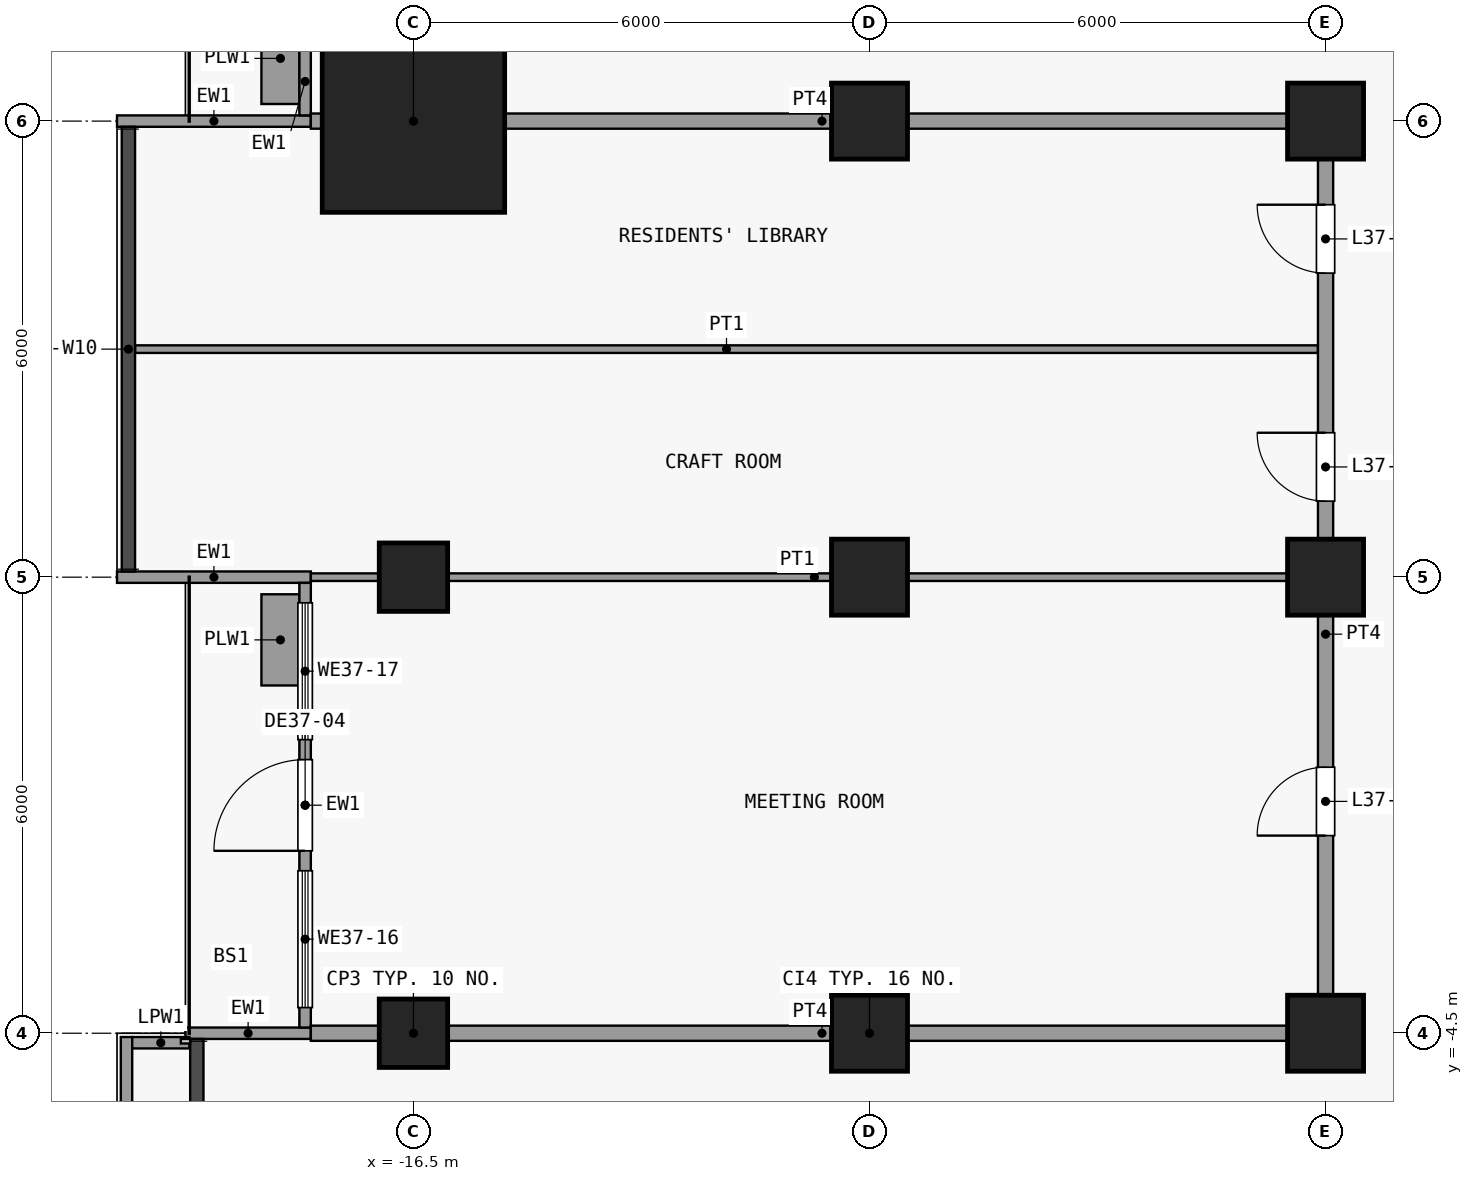
"""IFC4 building model, lengths in metres.
Left out: names, types, materials, properties, quantities, classifications, styles, units other than length and angle.
Written with IfcOpenShell. Run it as: python <this file> out.ifc"""

import sys

from ifc_helpers import new_model, si_unit, direction, frame, frame_2d, origin, origin_2d, place, context, subcontext, project, spatial, rectangle, extrude, element, fill, save


model = new_model("IFC4")
c1 = context("Model", 3, precision=1e-05, world=origin(), true_north=direction((0.0, 1.0)))
c2 = subcontext(c1, "Body", "Model", "MODEL_VIEW")
j1 = project(units=[si_unit("LENGTHUNIT", "METRE"), si_unit("PLANEANGLEUNIT", "RADIAN")], contexts=[c1])
p1 = place(None, origin())
s1 = spatial("IfcSite", under=j1, at=p1, CompositionType="ELEMENT")
p2 = place(p1, origin())
s2 = spatial("IfcBuilding", under=s1, at=p2, CompositionType="ELEMENT")
p3 = place(p2, frame((0.0, 0.0, 152.9)))
s3 = spatial("IfcBuildingStorey", under=s2, at=p3, CompositionType="ELEMENT", Elevation=152.9)
for number, where, z_axis, x_axis in (
    (1, (-16.5, -4.5, 0.0), (0.0, 0.0, 1.0), (1.0, 0.0, 0.0)),
    (2, (-16.5, 1.5, 0.0), (0.0, 0.0, 1.0), (1.0, 0.0, 0.0)),
):
    element("IfcColumn", number, at=place(p3, frame(where, z_axis=z_axis, x_axis=x_axis)), inside=s3, PredefinedType="COLUMN", context=c2, shape_type="SweptSolid", body=[
        extrude(rectangle(XDim=0.9, YDim=0.9, at=origin_2d()), origin(), (0.0, 0.0, 1.0), 3.6),
    ])
p4 = place(p3, frame((-16.5, 7.5, 0.0), z_axis=(0.0, 0.0, 1.0), x_axis=(1.0, 0.0, 0.0)))
e3 = element("IfcColumn", 3, at=p4, inside=s3, PredefinedType="COLUMN", context=c2, shape_type="SweptSolid", body=[
    extrude(rectangle(XDim=2.4, YDim=2.4, at=origin_2d()), origin(), (0.0, 0.0, 1.0), 3.6),
])
for number, where, z_axis, x_axis in (
    (4, (-10.5, -4.5, 0.0), (0.0, 0.0, 1.0), (1.0, 0.0, 0.0)),
    (5, (-10.5, 1.5, 0.0), (0.0, 0.0, 1.0), (1.0, 0.0, 0.0)),
    (6, (-10.5, 7.5, 0.0), (0.0, 0.0, 1.0), (1.0, 0.0, 0.0)),
    (7, (-4.5, -4.5, 0.0), (0.0, 0.0, 1.0), (1.0, 0.0, 0.0)),
    (8, (-4.5, 1.5, 0.0), (0.0, 0.0, 1.0), (1.0, 0.0, 0.0)),
    (9, (-4.5, 7.5, 0.0), (0.0, 0.0, 1.0), (1.0, 0.0, 0.0)),
):
    element("IfcColumn", number, at=place(p3, frame(where, z_axis=z_axis, x_axis=x_axis)), inside=s3, PredefinedType="COLUMN", context=c2, shape_type="SweptSolid", body=[
        extrude(rectangle(XDim=1.0, YDim=1.0, at=origin_2d()), origin(), (0.0, 0.0, 1.0), 3.6),
    ])
p5 = place(p3, frame((-17.85, -4.5, 0.0), z_axis=(0.0, 0.0, 1.0), x_axis=(-1.0, 0.0, 0.0)))
e10 = element("IfcWall", 10, at=p5, inside=s3, PredefinedType="SOLIDWALL", context=c2, shape_type="SweptSolid", body=[
    extrude(rectangle(XDim=1.65, YDim=0.15, at=frame_2d((0.825, 0.0))), origin(), (0.0, 0.0, 1.0), 3.3),
])
p6 = place(p3, frame((-17.85, 1.5, 0.0), z_axis=(0.0, 0.0, 1.0), x_axis=(-1.0, 0.0, 0.0)))
e11 = element("IfcWall", 11, at=p6, inside=s3, PredefinedType="SOLIDWALL", context=c2, shape_type="SweptSolid", body=[
    extrude(rectangle(XDim=2.55, YDim=0.15, at=frame_2d((1.275, 0.0))), origin(), (0.0, 0.0, 1.0), 3.3),
])
p7 = place(p3, frame((-17.925, -4.425, 0.0), z_axis=(0.0, 0.0, 1.0), x_axis=(0.0, 1.0, 0.0)))
e12 = element("IfcWall", 12, at=p7, inside=s3, PredefinedType="SOLIDWALL", context=c2, shape_type="SweptSolid", body=[
    extrude(rectangle(XDim=5.85, YDim=0.15, at=frame_2d((2.925, 0.0))), origin(), (0.0, 0.0, 1.0), 3.3),
])
p8 = place(p7, frame((2.325, 0.0, 0.0)))
e13 = element("IfcOpeningElement", 13, at=p8, cuts=e12, PredefinedType="OPENING", context=c2, shape_type="SweptSolid", body=[
    extrude(rectangle(XDim=1.2, YDim=2.4, at=frame_2d((0.6, 1.2))), frame((0.0, 0.085, 0.0), z_axis=(0.0, -1.0, 0.0), x_axis=(1.0, 0.0, 0.0)), (0.0, 0.0, 1.0), 0.17),
])
p9 = place(p7, frame((0.262, 0.0, 0.9)))
e14 = element("IfcOpeningElement", 14, at=p9, cuts=e12, PredefinedType="OPENING", context=c2, shape_type="SweptSolid", body=[
    extrude(rectangle(XDim=1.8, YDim=2.1, at=frame_2d((0.9, 1.05))), frame((0.0, 0.085, 0.0), z_axis=(0.0, -1.0, 0.0), x_axis=(1.0, 0.0, 0.0)), (0.0, 0.0, 1.0), 0.17),
])
p10 = place(p7, frame((3.788, 0.0, 0.9)))
e15 = element("IfcOpeningElement", 15, at=p10, cuts=e12, PredefinedType="OPENING", context=c2, shape_type="SweptSolid", body=[
    extrude(rectangle(XDim=1.8, YDim=2.1, at=frame_2d((0.9, 1.05))), frame((0.0, 0.085, 0.0), z_axis=(0.0, -1.0, 0.0), x_axis=(1.0, 0.0, 0.0)), (0.0, 0.0, 1.0), 0.17),
])
p11 = place(p3, frame((-18.25, 0.075, 0.0), z_axis=(0.0, 0.0, 1.0), x_axis=(0.0, 1.0, 0.0)))
e16 = element("IfcWall", 16, at=p11, inside=s3, PredefinedType="USERDEFINED", context=c2, shape_type="SweptSolid", body=[
    extrude(rectangle(XDim=1.2, YDim=0.5, at=frame_2d((0.6, 0.0))), origin(), (0.0, 0.0, 1.0), 0.9),
])
p12 = place(p3, frame((-17.85, 7.5, 0.0), z_axis=(0.0, 0.0, 1.0), x_axis=(-1.0, 0.0, 0.0)))
e17 = element("IfcWall", 17, at=p12, inside=s3, PredefinedType="SOLIDWALL", context=c2, shape_type="SweptSolid", body=[
    extrude(rectangle(XDim=2.55, YDim=0.15, at=frame_2d((1.275, 0.0))), origin(), (0.0, 0.0, 1.0), 3.3),
])
p13 = place(p3, frame((-17.925, 7.575, 0.0), z_axis=(0.0, 0.0, 1.0), x_axis=(0.0, 1.0, 0.0)))
e18 = element("IfcWall", 18, at=p13, inside=s3, PredefinedType="SOLIDWALL", context=c2, shape_type="SweptSolid", body=[
    extrude(rectangle(XDim=5.85, YDim=0.15, at=frame_2d((2.925, 0.0))), origin(), (0.0, 0.0, 1.0), 3.3),
])
p14 = place(p13, frame((3.825, 0.0, 0.0)))
e19 = element("IfcOpeningElement", 19, at=p14, cuts=e18, PredefinedType="OPENING", context=c2, shape_type="SweptSolid", body=[
    extrude(rectangle(XDim=1.2, YDim=2.4, at=frame_2d((0.6, 1.2))), frame((0.0, 0.085, 0.0), z_axis=(0.0, -1.0, 0.0), x_axis=(1.0, 0.0, 0.0)), (0.0, 0.0, 1.0), 0.17),
])
p15 = place(p13, frame((1.012, 0.0, 0.9)))
e20 = element("IfcOpeningElement", 20, at=p15, cuts=e18, PredefinedType="OPENING", context=c2, shape_type="SweptSolid", body=[
    extrude(rectangle(XDim=1.8, YDim=2.1, at=frame_2d((0.9, 1.05))), frame((0.0, 0.085, 0.0), z_axis=(0.0, -1.0, 0.0), x_axis=(1.0, 0.0, 0.0)), (0.0, 0.0, 1.0), 0.17),
])
p16 = place(p3, frame((-18.25, 7.725, 0.0), z_axis=(0.0, 0.0, 1.0), x_axis=(0.0, 1.0, 0.0)))
e21 = element("IfcWall", 21, at=p16, inside=s3, PredefinedType="USERDEFINED", context=c2, shape_type="SweptSolid", body=[
    extrude(rectangle(XDim=1.2, YDim=0.5, at=frame_2d((0.6, 0.0))), origin(), (0.0, 0.0, 1.0), 0.9),
])
p17 = place(p3, frame((-20.275, -13.3, 0.0), z_axis=(0.0, 0.0, 1.0), x_axis=(0.0, 1.0, 0.0)))
e22 = element("IfcWall", 22, at=p17, inside=s3, PredefinedType="PARAPET", context=c2, shape_type="SweptSolid", body=[
    extrude(rectangle(XDim=8.75, YDim=0.15, at=frame_2d((4.375, 0.0))), origin(), (0.0, 0.0, 1.0), 1.15),
])
p18 = place(p3, frame((-20.2, -4.625, 0.0), z_axis=(0.0, 0.0, 1.0), x_axis=(1.0, 0.0, 0.0)))
e23 = element("IfcWall", 23, at=p18, inside=s3, PredefinedType="PARAPET", context=c2, shape_type="SweptSolid", body=[
    extrude(rectangle(XDim=0.752, YDim=0.15, at=frame_2d((0.376, 0.0))), origin(), (0.0, 0.0, 1.0), 1.15),
])
p19 = place(p3, frame((-17.85, -4.5, 0.0), z_axis=(0.0, 0.0, 1.0), x_axis=(1.0, 0.0, 0.0)))
e24 = element("IfcWall", 24, at=p19, inside=s3, PredefinedType="PARTITIONING", context=c2, shape_type="SweptSolid", body=[
    extrude(rectangle(XDim=13.45, YDim=0.2, at=frame_2d((6.725, 0.0))), origin(), (0.0, 0.0, 1.0), 3.3),
])
p20 = place(p3, frame((-17.85, 1.5, 0.0), z_axis=(0.0, 0.0, 1.0), x_axis=(1.0, 0.0, 0.0)))
e25 = element("IfcWall", 25, at=p20, inside=s3, PredefinedType="PARTITIONING", context=c2, shape_type="SweptSolid", body=[
    extrude(rectangle(XDim=13.25, YDim=0.1, at=frame_2d((6.625, 0.0))), origin(), (0.0, 0.0, 1.0), 3.3),
])
p21 = place(p3, frame((-20.163, 4.5, 0.0), z_axis=(0.0, 0.0, 1.0), x_axis=(1.0, 0.0, 0.0)))
e26 = element("IfcWall", 26, at=p21, inside=s3, PredefinedType="PARTITIONING", context=c2, shape_type="SweptSolid", body=[
    extrude(rectangle(XDim=15.562, YDim=0.1, at=frame_2d((7.781, 0.0))), origin(), (0.0, 0.0, 1.0), 3.3),
])
p22 = place(p3, frame((-17.85, 7.5, 0.0), z_axis=(0.0, 0.0, 1.0), x_axis=(1.0, 0.0, 0.0)))
e27 = element("IfcWall", 27, at=p22, inside=s3, PredefinedType="PARTITIONING", context=c2, shape_type="SweptSolid", body=[
    extrude(rectangle(XDim=13.45, YDim=0.2, at=frame_2d((6.725, 0.0))), origin(), (0.0, 0.0, 1.0), 3.3),
])
p23 = place(p3, frame((-4.5, -4.4, 0.0), z_axis=(0.0, 0.0, 1.0), x_axis=(0.0, 1.0, 0.0)))
e28 = element("IfcWall", 28, at=p23, inside=s3, PredefinedType="PARTITIONING", context=c2, shape_type="SweptSolid", body=[
    extrude(rectangle(XDim=11.8, YDim=0.2, at=frame_2d((5.9, 0.0))), origin(), (0.0, 0.0, 1.0), 3.3),
])
p24 = place(p23, frame((2.5, 0.0, 0.0)))
e29 = element("IfcOpeningElement", 29, at=p24, cuts=e28, PredefinedType="OPENING", context=c2, shape_type="SweptSolid", body=[
    extrude(rectangle(XDim=0.9, YDim=2.1, at=frame_2d((0.45, 1.05))), frame((0.0, 0.11, 0.0), z_axis=(0.0, -1.0, 0.0), x_axis=(1.0, 0.0, 0.0)), (0.0, 0.0, 1.0), 0.22),
])
p25 = place(p23, frame((6.9, 0.0, 0.0)))
e30 = element("IfcOpeningElement", 30, at=p25, cuts=e28, PredefinedType="OPENING", context=c2, shape_type="SweptSolid", body=[
    extrude(rectangle(XDim=0.9, YDim=2.1, at=frame_2d((0.45, 1.05))), frame((0.0, 0.11, 0.0), z_axis=(0.0, -1.0, 0.0), x_axis=(1.0, 0.0, 0.0)), (0.0, 0.0, 1.0), 0.22),
])
p26 = place(p23, frame((9.9, 0.0, 0.0)))
e31 = element("IfcOpeningElement", 31, at=p26, cuts=e28, PredefinedType="OPENING", context=c2, shape_type="SweptSolid", body=[
    extrude(rectangle(XDim=0.9, YDim=2.1, at=frame_2d((0.45, 1.05))), frame((0.0, 0.11, 0.0), z_axis=(0.0, -1.0, 0.0), x_axis=(1.0, 0.0, 0.0)), (0.0, 0.0, 1.0), 0.22),
])
p27 = place(p8, origin())
e32 = element("IfcDoor", 32, at=p27, inside=s3, OperationType="SINGLE_SWING_LEFT", PredefinedType="DOOR", context=c2, shape_type="SweptSolid", body=[
    extrude(rectangle(XDim=1.2, YDim=2.4, at=frame_2d((0.6, 1.2))), frame((0.0, 0.025, 0.0), z_axis=(0.0, -1.0, 0.0), x_axis=(1.0, 0.0, 0.0)), (0.0, 0.0, 1.0), 0.05),
])
fill(e13, e32)
p28 = place(p9, origin())
e33 = element("IfcWindow", 33, at=p28, inside=s3, PartitioningType="SINGLE_PANEL", PredefinedType="WINDOW", context=c2, shape_type="SweptSolid", body=[
    extrude(rectangle(XDim=1.8, YDim=2.1, at=frame_2d((0.9, 1.05))), frame((0.0, 0.03, 0.0), z_axis=(0.0, -1.0, 0.0), x_axis=(1.0, 0.0, 0.0)), (0.0, 0.0, 1.0), 0.06),
])
fill(e14, e33)
p29 = place(p10, origin())
e34 = element("IfcWindow", 34, at=p29, inside=s3, PartitioningType="SINGLE_PANEL", PredefinedType="WINDOW", context=c2, shape_type="SweptSolid", body=[
    extrude(rectangle(XDim=1.8, YDim=2.1, at=frame_2d((0.9, 1.05))), frame((0.0, 0.03, 0.0), z_axis=(0.0, -1.0, 0.0), x_axis=(1.0, 0.0, 0.0)), (0.0, 0.0, 1.0), 0.06),
])
fill(e15, e34)
p30 = place(p24, origin())
e35 = element("IfcDoor", 35, at=p30, inside=s3, OperationType="SINGLE_SWING_RIGHT", PredefinedType="DOOR", context=c2, shape_type="SweptSolid", body=[
    extrude(rectangle(XDim=0.9, YDim=2.1, at=frame_2d((0.45, 1.05))), frame((0.0, 0.025, 0.0), z_axis=(0.0, -1.0, 0.0), x_axis=(1.0, 0.0, 0.0)), (0.0, 0.0, 1.0), 0.05),
])
fill(e29, e35)
p31 = place(p25, origin())
e36 = element("IfcDoor", 36, at=p31, inside=s3, OperationType="SINGLE_SWING_LEFT", PredefinedType="DOOR", context=c2, shape_type="SweptSolid", body=[
    extrude(rectangle(XDim=0.9, YDim=2.1, at=frame_2d((0.45, 1.05))), frame((0.0, 0.025, 0.0), z_axis=(0.0, -1.0, 0.0), x_axis=(1.0, 0.0, 0.0)), (0.0, 0.0, 1.0), 0.05),
])
fill(e30, e36)
p32 = place(p26, origin())
e37 = element("IfcDoor", 37, at=p32, inside=s3, OperationType="SINGLE_SWING_LEFT", PredefinedType="DOOR", context=c2, shape_type="SweptSolid", body=[
    extrude(rectangle(XDim=0.9, YDim=2.1, at=frame_2d((0.45, 1.05))), frame((0.0, 0.025, 0.0), z_axis=(0.0, -1.0, 0.0), x_axis=(1.0, 0.0, 0.0)), (0.0, 0.0, 1.0), 0.05),
])
fill(e31, e37)
save(model, sys.argv[1])
